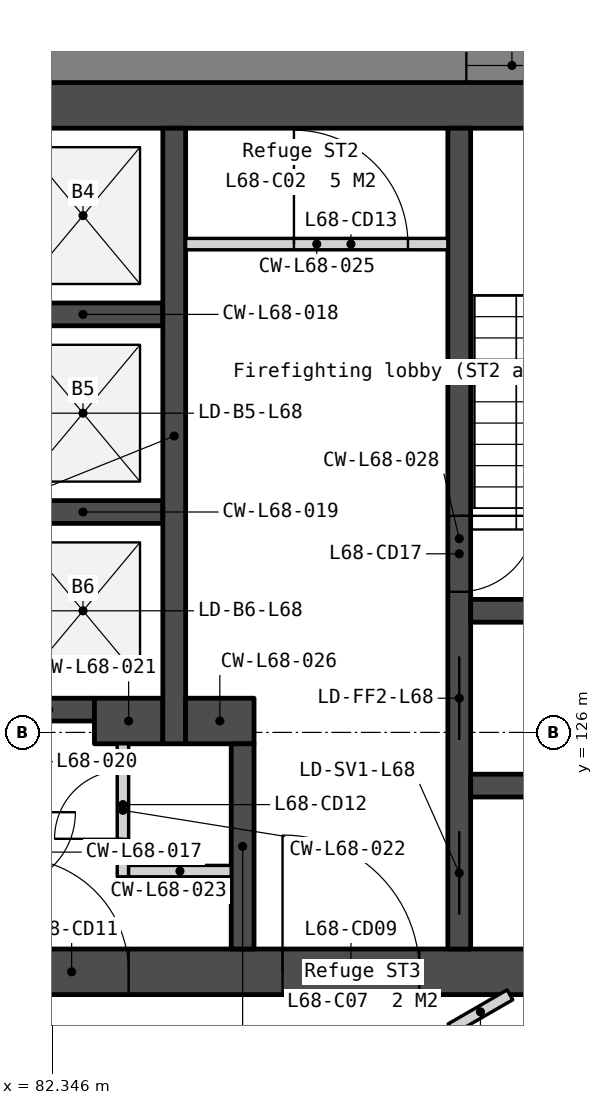
"""IFC4 building model, lengths in metres.
Left out: names, types, materials, properties, quantities, classifications, styles, units other than length and angle.
Written with IfcOpenShell. Run it as: python <this file> out.ifc"""

import sys

from ifc_helpers import new_model, si_unit, direction, frame, frame_2d, origin, place, context, subcontext, project, spatial, polyline, rectangle, outline, extrude, element, fill, save


model = new_model("IFC4")
c1 = context("Model", 3, precision=1e-05, world=origin(), true_north=direction((0.0, 1.0)))
c2 = subcontext(c1, "Body", "Model", "MODEL_VIEW")
j1 = project(units=[si_unit("LENGTHUNIT", "METRE"), si_unit("PLANEANGLEUNIT", "RADIAN")], contexts=[c1])
p1 = place(None, origin())
s1 = spatial("IfcSite", under=j1, at=p1, CompositionType="ELEMENT")
p2 = place(p1, origin())
s2 = spatial("IfcBuilding", under=s1, at=p2, CompositionType="ELEMENT")
p3 = place(p2, frame((0.0, 0.0, 277.7)))
s3 = spatial("IfcBuildingStorey", under=s2, at=p3, CompositionType="ELEMENT", Elevation=277.7)
p4 = place(p3, frame((69.0, 134.25, 0.0), z_axis=(0.0, 0.0, 1.0), x_axis=(1.0, 0.0, 0.0)))
e1 = element("IfcWall", 1, at=p4, inside=s3, PredefinedType="SOLIDWALL", context=c2, shape_type="SweptSolid", body=[
    extrude(rectangle(XDim=22.0, YDim=0.6, at=frame_2d((11.0, 0.0))), origin(), (0.0, 0.0, 1.0), 3.75),
])
p5 = place(p3, frame((69.0, 122.85, 0.0), z_axis=(0.0, 0.0, 1.0), x_axis=(1.0, 0.0, 0.0)))
e2 = element("IfcWall", 2, at=p5, inside=s3, PredefinedType="SOLIDWALL", context=c2, shape_type="SweptSolid", body=[
    extrude(rectangle(XDim=22.0, YDim=0.6, at=frame_2d((11.0, 0.0))), origin(), (0.0, 0.0, 1.0), 3.75),
])
p6 = place(p5, frame((16.375, 0.0, 0.0)))
e3 = element("IfcOpeningElement", 3, at=p6, cuts=e2, PredefinedType="OPENING", context=c2, shape_type="SweptSolid", body=[
    extrude(rectangle(XDim=1.8, YDim=2.1, at=frame_2d((0.9, 1.05))), frame((0.0, 0.31, 0.0), z_axis=(0.0, -1.0, 0.0), x_axis=(1.0, 0.0, 0.0)), (0.0, 0.0, 1.0), 0.62),
])
p7 = place(p5, frame((3.825, 0.0, 0.0)))
e4 = element("IfcOpeningElement", 4, at=p7, cuts=e2, PredefinedType="OPENING", context=c2, shape_type="SweptSolid", body=[
    extrude(rectangle(XDim=1.8, YDim=2.1, at=frame_2d((0.9, 1.05))), frame((0.0, 0.31, 0.0), z_axis=(0.0, -1.0, 0.0), x_axis=(1.0, 0.0, 0.0)), (0.0, 0.0, 1.0), 0.62),
])
p8 = place(p5, frame((12.85, 0.0, 0.0)))
e5 = element("IfcOpeningElement", 5, at=p8, cuts=e2, PredefinedType="OPENING", context=c2, shape_type="SweptSolid", body=[
    extrude(rectangle(XDim=1.5, YDim=2.1, at=frame_2d((0.75, 1.05))), frame((0.0, 0.31, 0.0), z_axis=(0.0, -1.0, 0.0), x_axis=(1.0, 0.0, 0.0)), (0.0, 0.0, 1.0), 0.62),
])
for number, where, z_axis, x_axis in (
    (6, (81.7, 131.5, 0.0), (0.0, 0.0, 1.0), (1.0, 0.0, 0.0)),
    (7, (81.7, 128.9, 0.0), (0.0, 0.0, 1.0), (1.0, 0.0, 0.0)),
):
    element("IfcWall", number, at=place(p3, frame(where, z_axis=z_axis, x_axis=x_axis)), inside=s3, PredefinedType="SOLIDWALL", context=c2, shape_type="SweptSolid", body=[
        extrude(rectangle(XDim=2.1, YDim=0.3, at=frame_2d((1.05, 0.0))), origin(), (0.0, 0.0, 1.0), 3.75),
    ])
p9 = place(p3, frame((81.7, 126.3, 0.0), z_axis=(0.0, 0.0, 1.0), x_axis=(1.0, 0.0, 0.0)))
e8 = element("IfcWall", 8, at=p9, inside=s3, PredefinedType="SOLIDWALL", context=c2, shape_type="SweptSolid", body=[
    extrude(rectangle(XDim=1.2, YDim=0.3, at=frame_2d((0.6, 0.0))), origin(), (0.0, 0.0, 1.0), 3.75),
])
p10 = place(p3, frame((82.9, 126.15, 0.0), z_axis=(0.0, 0.0, 1.0), x_axis=(1.0, 0.0, 0.0)))
e9 = element("IfcWall", 9, at=p10, inside=s3, PredefinedType="SOLIDWALL", context=c2, shape_type="SweptSolid", body=[
    extrude(rectangle(XDim=0.9, YDim=0.6, at=frame_2d((0.45, 0.0))), origin(), (0.0, 0.0, 1.0), 3.75),
])
p11 = place(p3, frame((83.275, 125.85, 0.0), z_axis=(0.0, 0.0, 1.0), x_axis=(0.0, -1.0, 0.0)))
e10 = element("IfcWall", 10, at=p11, inside=s3, PredefinedType="PARTITIONING", context=c2, shape_type="SweptSolid", body=[
    extrude(rectangle(XDim=1.75, YDim=0.15, at=frame_2d((0.875, 0.0))), origin(), (0.0, 0.0, 1.0), 3.75),
])
p12 = place(p11, frame((0.35, 0.0, 0.0)))
e11 = element("IfcOpeningElement", 11, at=p12, cuts=e10, PredefinedType="OPENING", context=c2, shape_type="SweptSolid", body=[
    extrude(rectangle(XDim=0.9, YDim=2.1, at=frame_2d((0.45, 1.05))), frame((0.0, 0.085, 0.0), z_axis=(0.0, -1.0, 0.0), x_axis=(1.0, 0.0, 0.0)), (0.0, 0.0, 1.0), 0.17),
])
p13 = place(p3, frame((83.35, 124.175, 0.0), z_axis=(0.0, 0.0, 1.0), x_axis=(1.0, 0.0, 0.0)))
e12 = element("IfcWall", 12, at=p13, inside=s3, PredefinedType="PARTITIONING", context=c2, shape_type="SweptSolid", body=[
    extrude(rectangle(XDim=1.35, YDim=0.15, at=frame_2d((0.675, 0.0))), origin(), (0.0, 0.0, 1.0), 3.75),
])
p14 = place(p3, frame((83.95, 133.95, 0.0), z_axis=(0.0, 0.0, 1.0), x_axis=(0.0, -1.0, 0.0)))
e13 = element("IfcWall", 13, at=p14, inside=s3, PredefinedType="SOLIDWALL", context=c2, shape_type="SweptSolid", body=[
    extrude(rectangle(XDim=8.1, YDim=0.3, at=frame_2d((4.05, 0.0))), origin(), (0.0, 0.0, 1.0), 3.75),
])
p15 = place(p3, frame((84.1, 132.425, 0.0), z_axis=(0.0, 0.0, 1.0), x_axis=(1.0, 0.0, 0.0)))
e14 = element("IfcWall", 14, at=p15, inside=s3, PredefinedType="PARTITIONING", context=c2, shape_type="SweptSolid", body=[
    extrude(rectangle(XDim=3.45, YDim=0.15, at=frame_2d((1.725, 0.0))), origin(), (0.0, 0.0, 1.0), 3.75),
])
p16 = place(p15, frame((1.425, 0.0, 0.0)))
e15 = element("IfcOpeningElement", 15, at=p16, cuts=e14, PredefinedType="OPENING", context=c2, shape_type="SweptSolid", body=[
    extrude(rectangle(XDim=1.5, YDim=2.1, at=frame_2d((0.75, 1.05))), frame((0.0, 0.085, 0.0), z_axis=(0.0, -1.0, 0.0), x_axis=(1.0, 0.0, 0.0)), (0.0, 0.0, 1.0), 0.17),
])
p17 = place(p3, frame((84.1, 126.15, 0.0), z_axis=(0.0, 0.0, 1.0), x_axis=(1.0, 0.0, 0.0)))
e16 = element("IfcWall", 16, at=p17, inside=s3, PredefinedType="SOLIDWALL", context=c2, shape_type="SweptSolid", body=[
    extrude(rectangle(XDim=0.9, YDim=0.6, at=frame_2d((0.45, 0.0))), origin(), (0.0, 0.0, 1.0), 3.75),
])
p18 = place(p3, frame((84.85, 125.85, 0.0), z_axis=(0.0, 0.0, 1.0), x_axis=(0.0, -1.0, 0.0)))
e17 = element("IfcWall", 17, at=p18, inside=s3, PredefinedType="SOLIDWALL", context=c2, shape_type="SweptSolid", body=[
    extrude(rectangle(XDim=2.7, YDim=0.3, at=frame_2d((1.35, 0.0))), origin(), (0.0, 0.0, 1.0), 3.75),
])
p19 = place(p3, frame((87.7, 133.95, 0.0), z_axis=(0.0, 0.0, 1.0), x_axis=(0.0, -1.0, 0.0)))
e18 = element("IfcWall", 18, at=p19, inside=s3, PredefinedType="SOLIDWALL", context=c2, shape_type="SweptSolid", body=[
    extrude(rectangle(XDim=10.8, YDim=0.3, at=frame_2d((5.4, 0.0))), origin(), (0.0, 0.0, 1.0), 3.75),
])
p20 = place(p19, frame((6.95, 0.0, 0.0)))
e19 = element("IfcOpeningElement", 19, at=p20, cuts=e18, PredefinedType="OPENING", context=c2, shape_type="SweptSolid", body=[
    extrude(rectangle(XDim=1.1, YDim=2.1, at=frame_2d((0.55, 1.05))), frame((0.0, 0.16, 0.0), z_axis=(0.0, -1.0, 0.0), x_axis=(1.0, 0.0, 0.0)), (0.0, 0.0, 1.0), 0.32),
])
p21 = place(p19, frame((5.1, 0.0, 0.0)))
e20 = element("IfcOpeningElement", 20, at=p21, cuts=e18, PredefinedType="OPENING", context=c2, shape_type="SweptSolid", body=[
    extrude(rectangle(XDim=1.0, YDim=2.1, at=frame_2d((0.5, 1.05))), frame((0.0, 0.16, 0.0), z_axis=(0.0, -1.0, 0.0), x_axis=(1.0, 0.0, 0.0)), (0.0, 0.0, 1.0), 0.32),
])
p22 = place(p19, frame((9.25, 0.0, 0.0)))
e21 = element("IfcOpeningElement", 21, at=p22, cuts=e18, PredefinedType="OPENING", context=c2, shape_type="SweptSolid", body=[
    extrude(rectangle(XDim=1.1, YDim=2.1, at=frame_2d((0.55, 1.05))), frame((0.0, 0.16, 0.0), z_axis=(0.0, -1.0, 0.0), x_axis=(1.0, 0.0, 0.0)), (0.0, 0.0, 1.0), 0.32),
])
for number, where, z_axis, x_axis in (
    (22, (87.85, 127.6, 0.0), (0.0, 0.0, 1.0), (1.0, 0.0, 0.0)),
    (23, (87.85, 125.3, 0.0), (0.0, 0.0, 1.0), (1.0, 0.0, 0.0)),
):
    element("IfcWall", number, at=place(p3, frame(where, z_axis=z_axis, x_axis=x_axis)), inside=s3, PredefinedType="SOLIDWALL", context=c2, shape_type="SweptSolid", body=[
        extrude(rectangle(XDim=2.55, YDim=0.3, at=frame_2d((1.275, 0.0))), origin(), (0.0, 0.0, 1.0), 3.75),
    ])
p23 = place(p3, frame((98.486, 134.775, -0.15), z_axis=(0.0, 0.0, 1.0), x_axis=(-1.0, 0.0, 0.0)))
e24 = element("IfcWall", 24, at=p23, inside=s3, PredefinedType="SOLIDWALL", context=c2, shape_type="SweptSolid", body=[
    extrude(outline(polyline([(36.972, 0.0), (36.972, 3.9), (0.0, 3.9), (0.0, 0.0), (36.972, 0.0)])), frame((0.0, 0.225, 0.0), z_axis=(0.0, -1.0, 0.0), x_axis=(1.0, 0.0, 0.0)), (0.0, 0.0, 1.0), 0.45),
])
p24 = place(p23, frame((0.744, 0.0, 0.95)))
e25 = element("IfcOpeningElement", 25, at=p24, cuts=e24, PredefinedType="OPENING", context=c2, shape_type="SweptSolid", body=[
    extrude(rectangle(XDim=1.2, YDim=2.2, at=frame_2d((0.6, 1.1))), frame((0.0, 0.235, 0.0), z_axis=(0.0, -1.0, 0.0), x_axis=(1.0, 0.0, 0.0)), (0.0, 0.0, 1.0), 0.47),
])
p25 = place(p23, frame((7.793, 0.0, 0.95)))
e26 = element("IfcOpeningElement", 26, at=p25, cuts=e24, PredefinedType="OPENING", context=c2, shape_type="SweptSolid", body=[
    extrude(rectangle(XDim=1.2, YDim=2.2, at=frame_2d((0.6, 1.1))), frame((0.0, 0.235, 0.0), z_axis=(0.0, -1.0, 0.0), x_axis=(1.0, 0.0, 0.0)), (0.0, 0.0, 1.0), 0.47),
])
p26 = place(p23, frame((9.493, 0.0, 0.95)))
e27 = element("IfcOpeningElement", 27, at=p26, cuts=e24, PredefinedType="OPENING", context=c2, shape_type="SweptSolid", body=[
    extrude(rectangle(XDim=1.2, YDim=2.2, at=frame_2d((0.6, 1.1))), frame((0.0, 0.235, 0.0), z_axis=(0.0, -1.0, 0.0), x_axis=(1.0, 0.0, 0.0)), (0.0, 0.0, 1.0), 0.47),
])
p27 = place(p23, frame((17.036, 0.0, 0.95)))
e28 = element("IfcOpeningElement", 28, at=p27, cuts=e24, PredefinedType="OPENING", context=c2, shape_type="SweptSolid", body=[
    extrude(rectangle(XDim=1.2, YDim=2.2, at=frame_2d((0.6, 1.1))), frame((0.0, 0.235, 0.0), z_axis=(0.0, -1.0, 0.0), x_axis=(1.0, 0.0, 0.0)), (0.0, 0.0, 1.0), 0.47),
])
p28 = place(p23, frame((18.736, 0.0, 0.95)))
e29 = element("IfcOpeningElement", 29, at=p28, cuts=e24, PredefinedType="OPENING", context=c2, shape_type="SweptSolid", body=[
    extrude(rectangle(XDim=1.2, YDim=2.2, at=frame_2d((0.6, 1.1))), frame((0.0, 0.235, 0.0), z_axis=(0.0, -1.0, 0.0), x_axis=(1.0, 0.0, 0.0)), (0.0, 0.0, 1.0), 0.47),
])
p29 = place(p23, frame((26.279, 0.0, 0.95)))
e30 = element("IfcOpeningElement", 30, at=p29, cuts=e24, PredefinedType="OPENING", context=c2, shape_type="SweptSolid", body=[
    extrude(rectangle(XDim=1.2, YDim=2.2, at=frame_2d((0.6, 1.1))), frame((0.0, 0.235, 0.0), z_axis=(0.0, -1.0, 0.0), x_axis=(1.0, 0.0, 0.0)), (0.0, 0.0, 1.0), 0.47),
])
p30 = place(p23, frame((27.979, 0.0, 0.95)))
e31 = element("IfcOpeningElement", 31, at=p30, cuts=e24, PredefinedType="OPENING", context=c2, shape_type="SweptSolid", body=[
    extrude(rectangle(XDim=1.2, YDim=2.2, at=frame_2d((0.6, 1.1))), frame((0.0, 0.235, 0.0), z_axis=(0.0, -1.0, 0.0), x_axis=(1.0, 0.0, 0.0)), (0.0, 0.0, 1.0), 0.47),
])
p31 = place(p23, frame((35.028, 0.0, 0.95)))
e32 = element("IfcOpeningElement", 32, at=p31, cuts=e24, PredefinedType="OPENING", context=c2, shape_type="SweptSolid", body=[
    extrude(rectangle(XDim=1.2, YDim=2.2, at=frame_2d((0.6, 1.1))), frame((0.0, 0.235, 0.0), z_axis=(0.0, -1.0, 0.0), x_axis=(1.0, 0.0, 0.0)), (0.0, 0.0, 1.0), 0.47),
])
p32 = place(p3, frame((86.427, 110.752, -0.15), z_axis=(0.0, 0.0, 1.0), x_axis=(0.500000383388, 0.866025182435, 0.0)))
e33 = element("IfcWall", 33, at=p32, inside=s3, PredefinedType="SOLIDWALL", context=c2, shape_type="SweptSolid", body=[
    extrude(outline(polyline([(25.929, 3.9), (25.929, 0.0), (0.0, 0.0), (0.0, 3.9), (25.929, 3.9)])), frame((0.0, 0.225, 0.0), z_axis=(0.0, -1.0, 0.0), x_axis=(1.0, 0.0, 0.0)), (0.0, 0.0, 1.0), 0.45),
])
p33 = place(p32, frame((5.993, 0.0, 0.95)))
e34 = element("IfcOpeningElement", 34, at=p33, cuts=e33, PredefinedType="OPENING", context=c2, shape_type="SweptSolid", body=[
    extrude(rectangle(XDim=1.2, YDim=2.2, at=frame_2d((0.6, 1.1))), frame((0.0, 0.235, 0.0), z_axis=(0.0, -1.0, 0.0), x_axis=(1.0, 0.0, 0.0)), (0.0, 0.0, 1.0), 0.47),
])
p34 = place(p32, frame((7.693, 0.0, 0.95)))
e35 = element("IfcOpeningElement", 35, at=p34, cuts=e33, PredefinedType="OPENING", context=c2, shape_type="SweptSolid", body=[
    extrude(rectangle(XDim=1.2, YDim=2.2, at=frame_2d((0.6, 1.1))), frame((0.0, 0.235, 0.0), z_axis=(0.0, -1.0, 0.0), x_axis=(1.0, 0.0, 0.0)), (0.0, 0.0, 1.0), 0.47),
])
p35 = place(p32, frame((15.236, 0.0, 0.95)))
e36 = element("IfcOpeningElement", 36, at=p35, cuts=e33, PredefinedType="OPENING", context=c2, shape_type="SweptSolid", body=[
    extrude(rectangle(XDim=1.2, YDim=2.2, at=frame_2d((0.6, 1.1))), frame((0.0, 0.235, 0.0), z_axis=(0.0, -1.0, 0.0), x_axis=(1.0, 0.0, 0.0)), (0.0, 0.0, 1.0), 0.47),
])
p36 = place(p32, frame((16.936, 0.0, 0.95)))
e37 = element("IfcOpeningElement", 37, at=p36, cuts=e33, PredefinedType="OPENING", context=c2, shape_type="SweptSolid", body=[
    extrude(rectangle(XDim=1.2, YDim=2.2, at=frame_2d((0.6, 1.1))), frame((0.0, 0.235, 0.0), z_axis=(0.0, -1.0, 0.0), x_axis=(1.0, 0.0, 0.0)), (0.0, 0.0, 1.0), 0.47),
])
p37 = place(p32, frame((23.985, 0.0, 0.95)))
e38 = element("IfcOpeningElement", 38, at=p37, cuts=e33, PredefinedType="OPENING", context=c2, shape_type="SweptSolid", body=[
    extrude(rectangle(XDim=1.2, YDim=2.2, at=frame_2d((0.6, 1.1))), frame((0.0, 0.235, 0.0), z_axis=(0.0, -1.0, 0.0), x_axis=(1.0, 0.0, 0.0)), (0.0, 0.0, 1.0), 0.47),
])
p38 = place(p3, frame((87.591, 122.099, 0.0), z_axis=(0.0, 0.0, 1.0), x_axis=(0.866072174983, 0.499918981156, 0.0)))
e39 = element("IfcWall", 39, at=p38, inside=s3, PredefinedType="PARTITIONING", context=c2, shape_type="SweptSolid", body=[
    extrude(rectangle(XDim=0.896, YDim=0.15, at=frame_2d((0.448, 0.0))), origin(), (0.0, 0.0, 1.0), 3.75),
])
p39 = place(p20, origin())
e40 = element("IfcDoor", 40, at=p39, inside=s3, OperationType="SLIDING_TO_LEFT", PredefinedType="DOOR", context=c2, shape_type="SweptSolid", body=[
    extrude(rectangle(XDim=1.1, YDim=2.1, at=frame_2d((0.55, 1.05))), frame((0.0, 0.025, 0.0), z_axis=(0.0, -1.0, 0.0), x_axis=(1.0, 0.0, 0.0)), (0.0, 0.0, 1.0), 0.05),
])
fill(e19, e40)
p40 = place(p6, origin())
e41 = element("IfcDoor", 41, at=p40, inside=s3, OperationType="DOUBLE_DOOR_DOUBLE_SWING", PredefinedType="DOOR", context=c2, shape_type="SweptSolid", body=[
    extrude(rectangle(XDim=1.8, YDim=2.1, at=frame_2d((0.9, 1.05))), frame((0.0, 0.025, 0.0), z_axis=(0.0, -1.0, 0.0), x_axis=(1.0, 0.0, 0.0)), (0.0, 0.0, 1.0), 0.05),
])
fill(e3, e41)
p41 = place(p8, origin())
e42 = element("IfcDoor", 42, at=p41, inside=s3, OperationType="DOUBLE_DOOR_DOUBLE_SWING", PredefinedType="DOOR", context=c2, shape_type="SweptSolid", body=[
    extrude(rectangle(XDim=1.5, YDim=2.1, at=frame_2d((0.75, 1.05))), frame((0.0, 0.025, 0.0), z_axis=(0.0, -1.0, 0.0), x_axis=(1.0, 0.0, 0.0)), (0.0, 0.0, 1.0), 0.05),
])
fill(e5, e42)
p42 = place(p12, origin())
e43 = element("IfcDoor", 43, at=p42, inside=s3, OperationType="SINGLE_SWING_RIGHT", PredefinedType="DOOR", context=c2, shape_type="SweptSolid", body=[
    extrude(rectangle(XDim=0.9, YDim=2.1, at=frame_2d((0.45, 1.05))), frame((0.0, 0.025, 0.0), z_axis=(0.0, -1.0, 0.0), x_axis=(1.0, 0.0, 0.0)), (0.0, 0.0, 1.0), 0.05),
])
fill(e11, e43)
p43 = place(p16, origin())
e44 = element("IfcDoor", 44, at=p43, inside=s3, OperationType="DOUBLE_DOOR_DOUBLE_SWING", PredefinedType="DOOR", context=c2, shape_type="SweptSolid", body=[
    extrude(rectangle(XDim=1.5, YDim=2.1, at=frame_2d((0.75, 1.05))), frame((0.0, 0.025, 0.0), z_axis=(0.0, -1.0, 0.0), x_axis=(1.0, 0.0, 0.0)), (0.0, 0.0, 1.0), 0.05),
])
fill(e15, e44)
p44 = place(p21, origin())
e45 = element("IfcDoor", 45, at=p44, inside=s3, OperationType="SINGLE_SWING_LEFT", PredefinedType="DOOR", context=c2, shape_type="SweptSolid", body=[
    extrude(rectangle(XDim=1.0, YDim=2.1, at=frame_2d((0.5, 1.05))), frame((0.0, 0.025, 0.0), z_axis=(0.0, -1.0, 0.0), x_axis=(1.0, 0.0, 0.0)), (0.0, 0.0, 1.0), 0.05),
])
fill(e20, e45)
p45 = place(p22, origin())
e46 = element("IfcDoor", 46, at=p45, inside=s3, OperationType="SLIDING_TO_LEFT", PredefinedType="DOOR", context=c2, shape_type="SweptSolid", body=[
    extrude(rectangle(XDim=1.1, YDim=2.1, at=frame_2d((0.55, 1.05))), frame((0.0, 0.025, 0.0), z_axis=(0.0, -1.0, 0.0), x_axis=(1.0, 0.0, 0.0)), (0.0, 0.0, 1.0), 0.05),
])
fill(e21, e46)
p46 = place(p26, origin())
e47 = element("IfcWindow", 47, at=p46, inside=s3, PartitioningType="SINGLE_PANEL", PredefinedType="WINDOW", context=c2, shape_type="SweptSolid", body=[
    extrude(rectangle(XDim=1.2, YDim=2.2, at=frame_2d((0.6, 1.1))), frame((0.0, 0.03, 0.0), z_axis=(0.0, -1.0, 0.0), x_axis=(1.0, 0.0, 0.0)), (0.0, 0.0, 1.0), 0.06),
])
fill(e27, e47)
save(model, sys.argv[1])
